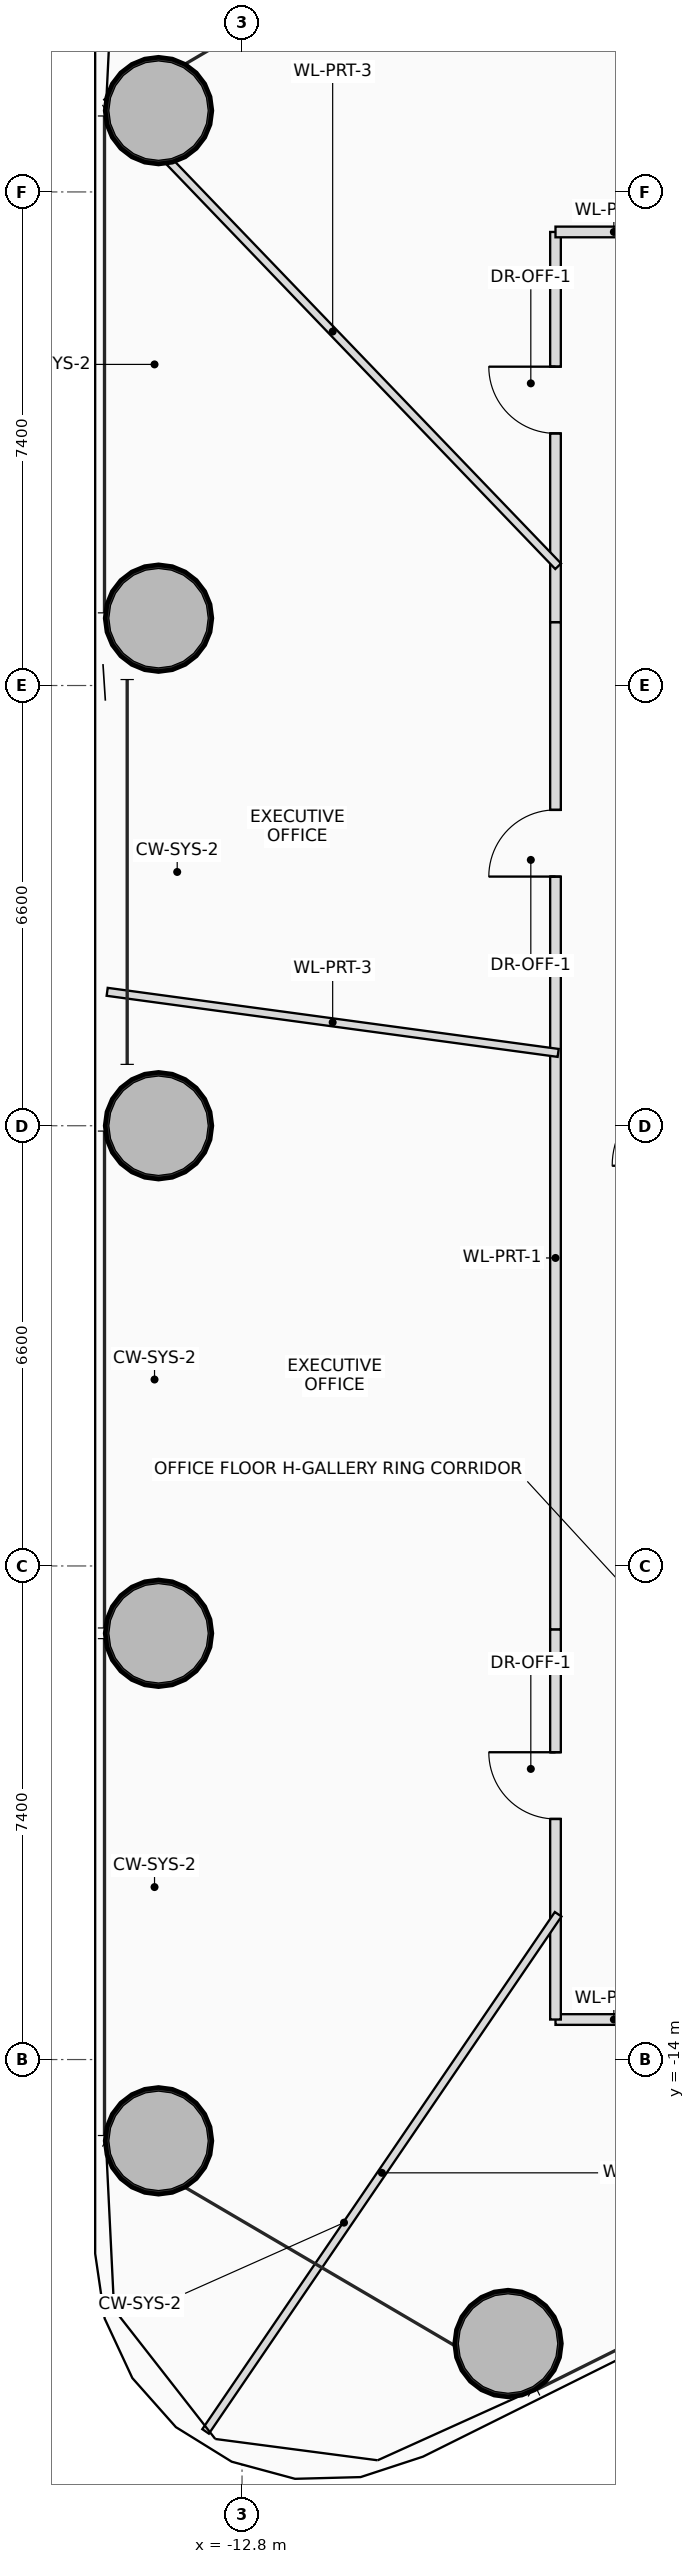
"""IFC4 building model, lengths in metres.
Left out: names, types, materials, properties, quantities, classifications, styles, units other than length and angle.
Written with IfcOpenShell. Run it as: python <this file> out.ifc"""

import sys

from ifc_helpers import new_model, si_unit, direction, frame, frame_2d, origin, origin_2d, place, context, subcontext, project, spatial, rectangle, hollow_circle, extrude, source, transform, mapped, element, fill, save


model = new_model("IFC4")
c1 = context("Model", 3, precision=1e-05, world=origin(), true_north=direction((0.0, 1.0)))
c2 = subcontext(c1, "Body", "Model", "MODEL_VIEW")
j1 = project(units=[si_unit("LENGTHUNIT", "METRE"), si_unit("PLANEANGLEUNIT", "RADIAN")], contexts=[c1])
p1 = place(None, origin())
s1 = spatial("IfcSite", under=j1, at=p1, CompositionType="ELEMENT")
p2 = place(p1, origin())
s2 = spatial("IfcBuilding", under=s1, at=p2, CompositionType="ELEMENT")
p3 = place(p2, frame((0.0, 0.0, 31.2)))
s3 = spatial("IfcBuildingStorey", under=s2, at=p3, CompositionType="ELEMENT", Elevation=31.2)
m1 = source(origin(), c2, "Body", "SweptSolid", [
    extrude(hollow_circle(Radius=0.8, WallThickness=0.055, at=origin_2d()), origin(), (0.0, 0.0, 1.0), 3.7),
])
for number, where, z_axis, x_axis in (
    (1, (-8.812, -18.258, 0.0), (0.0, 0.0, 1.0), (1.0, 0.0, 0.0)),
    (2, (-14.052, 15.219, 0.0), (0.0, 0.0, 1.0), (1.0, 0.0, 0.0)),
    (3, (-14.052, 7.61, 0.0), (0.0, 0.0, 1.0), (1.0, 0.0, 0.0)),
    (4, (-14.052, 0.0, 0.0), (0.0, 0.0, 1.0), (1.0, 0.0, 0.0)),
    (5, (-14.052, -7.61, 0.0), (0.0, 0.0, 1.0), (1.0, 0.0, 0.0)),
    (6, (-14.052, -15.219, 0.0), (0.0, 0.0, 1.0), (1.0, 0.0, 0.0)),
):
    element("IfcColumn", number, at=place(p3, frame(where, z_axis=z_axis, x_axis=x_axis)), inside=s3, PredefinedType="COLUMN", context=c2, shape_type="MappedRepresentation", body=[
        mapped(m1, transform((0.0, 0.0, 0.0), scale=1.0)),
    ])
p4 = place(p3, frame((-6.35, -13.4, 0.0), z_axis=(0.0, 0.0, 1.0), x_axis=(-1.0, 0.0, 0.0)))
e7 = element("IfcWall", 7, at=p4, inside=s3, PredefinedType="PARTITIONING", context=c2, shape_type="SweptSolid", body=[
    extrude(rectangle(XDim=1.75, YDim=0.16, at=frame_2d((0.875, 0.0))), origin(), (0.0, 0.0, 1.0), 2.8),
])
p5 = place(p3, frame((-8.1, -13.4, 0.0), z_axis=(0.0, 0.0, 1.0), x_axis=(0.0, 1.0, 0.0)))
e8 = element("IfcWall", 8, at=p5, inside=s3, PredefinedType="PARTITIONING", context=c2, shape_type="SweptSolid", body=[
    extrude(rectangle(XDim=5.85, YDim=0.16, at=frame_2d((2.925, 0.0))), origin(), (0.0, 0.0, 1.0), 2.8),
])
p6 = place(p5, frame((3.007, 0.0, 0.0)))
e9 = element("IfcOpeningElement", 9, at=p6, cuts=e8, PredefinedType="OPENING", context=c2, shape_type="SweptSolid", body=[
    extrude(rectangle(XDim=1.0, YDim=2.25, at=frame_2d((0.5, 1.125))), frame((0.0, 0.09, 0.0), z_axis=(0.0, -1.0, 0.0), x_axis=(1.0, 0.0, 0.0)), (0.0, 0.0, 1.0), 0.18),
])
p7 = place(p3, frame((-8.1, -7.55, 0.0), z_axis=(0.0, 0.0, 1.0), x_axis=(0.0, 1.0, 0.0)))
e10 = element("IfcWall", 10, at=p7, inside=s3, PredefinedType="PARTITIONING", context=c2, shape_type="SweptSolid", body=[
    extrude(rectangle(XDim=15.1, YDim=0.16, at=frame_2d((7.55, 0.0))), origin(), (0.0, 0.0, 1.0), 2.8),
])
p8 = place(p7, frame((11.285, 0.0, 0.0)))
e11 = element("IfcOpeningElement", 11, at=p8, cuts=e10, PredefinedType="OPENING", context=c2, shape_type="SweptSolid", body=[
    extrude(rectangle(XDim=1.0, YDim=2.25, at=frame_2d((0.5, 1.125))), frame((0.0, 0.09, 0.0), z_axis=(0.0, -1.0, 0.0), x_axis=(1.0, 0.0, 0.0)), (0.0, 0.0, 1.0), 0.18),
])
p9 = place(p3, frame((-8.1, 7.55, 0.0), z_axis=(0.0, 0.0, 1.0), x_axis=(0.0, 1.0, 0.0)))
e12 = element("IfcWall", 12, at=p9, inside=s3, PredefinedType="PARTITIONING", context=c2, shape_type="SweptSolid", body=[
    extrude(rectangle(XDim=5.85, YDim=0.16, at=frame_2d((2.925, 0.0))), origin(), (0.0, 0.0, 1.0), 2.8),
])
p10 = place(p9, frame((2.83, 0.0, 0.0)))
e13 = element("IfcOpeningElement", 13, at=p10, cuts=e12, PredefinedType="OPENING", context=c2, shape_type="SweptSolid", body=[
    extrude(rectangle(XDim=1.0, YDim=2.25, at=frame_2d((0.5, 1.125))), frame((0.0, 0.09, 0.0), z_axis=(0.0, -1.0, 0.0), x_axis=(1.0, 0.0, 0.0)), (0.0, 0.0, 1.0), 0.18),
])
p11 = place(p3, frame((-8.1, 13.4, 0.0), z_axis=(0.0, 0.0, 1.0), x_axis=(1.0, 0.0, 0.0)))
e14 = element("IfcWall", 14, at=p11, inside=s3, PredefinedType="PARTITIONING", context=c2, shape_type="SweptSolid", body=[
    extrude(rectangle(XDim=1.75, YDim=0.16, at=frame_2d((0.875, 0.0))), origin(), (0.0, 0.0, 1.0), 2.8),
])
p12 = place(p3, frame((-8.06, 8.388, 0.0), z_axis=(0.0, 0.0, 1.0), x_axis=(-0.692869708489, 0.721062803823, 0.0)))
e15 = element("IfcWall", 15, at=p12, inside=s3, PredefinedType="PARTITIONING", context=c2, shape_type="SweptSolid", body=[
    extrude(rectangle(XDim=9.759, YDim=0.12, at=frame_2d((4.88, 0.0))), origin(), (0.0, 0.0, 1.0), 2.8),
])
p13 = place(p3, frame((-8.06, 1.092, 0.0), z_axis=(0.0, 0.0, 1.0), x_axis=(-0.990948874496, 0.13423981576, 0.0)))
e16 = element("IfcWall", 16, at=p13, inside=s3, PredefinedType="PARTITIONING", context=c2, shape_type="SweptSolid", body=[
    extrude(rectangle(XDim=6.824, YDim=0.12, at=frame_2d((3.412, 0.0))), origin(), (0.0, 0.0, 1.0), 2.96),
])
p14 = place(p3, frame((-8.06, -11.822, 0.0), z_axis=(0.0, 0.0, 1.0), x_axis=(-0.56331583488, -0.826241653618, 0.0)))
e17 = element("IfcWall", 17, at=p14, inside=s3, PredefinedType="PARTITIONING", context=c2, shape_type="SweptSolid", body=[
    extrude(rectangle(XDim=9.384, YDim=0.12, at=frame_2d((4.692, 0.0))), origin(), (0.0, 0.0, 1.0), 2.96),
])
p15 = place(p6, origin())
e18 = element("IfcDoor", 18, at=p15, inside=s3, OperationType="SINGLE_SWING_RIGHT", PredefinedType="DOOR", context=c2, shape_type="SweptSolid", body=[
    extrude(rectangle(XDim=1.0, YDim=2.25, at=frame_2d((0.5, 1.125))), frame((0.0, 0.025, 0.0), z_axis=(0.0, -1.0, 0.0), x_axis=(1.0, 0.0, 0.0)), (0.0, 0.0, 1.0), 0.05),
])
fill(e9, e18)
p16 = place(p8, origin())
e19 = element("IfcDoor", 19, at=p16, inside=s3, OperationType="SINGLE_SWING_LEFT", PredefinedType="DOOR", context=c2, shape_type="SweptSolid", body=[
    extrude(rectangle(XDim=1.0, YDim=2.25, at=frame_2d((0.5, 1.125))), frame((0.0, 0.025, 0.0), z_axis=(0.0, -1.0, 0.0), x_axis=(1.0, 0.0, 0.0)), (0.0, 0.0, 1.0), 0.05),
])
fill(e11, e19)
p17 = place(p10, origin())
e20 = element("IfcDoor", 20, at=p17, inside=s3, OperationType="SINGLE_SWING_RIGHT", PredefinedType="DOOR", context=c2, shape_type="SweptSolid", body=[
    extrude(rectangle(XDim=1.0, YDim=2.25, at=frame_2d((0.5, 1.125))), frame((0.0, 0.025, 0.0), z_axis=(0.0, -1.0, 0.0), x_axis=(1.0, 0.0, 0.0)), (0.0, 0.0, 1.0), 0.05),
])
fill(e13, e20)
save(model, sys.argv[1])
